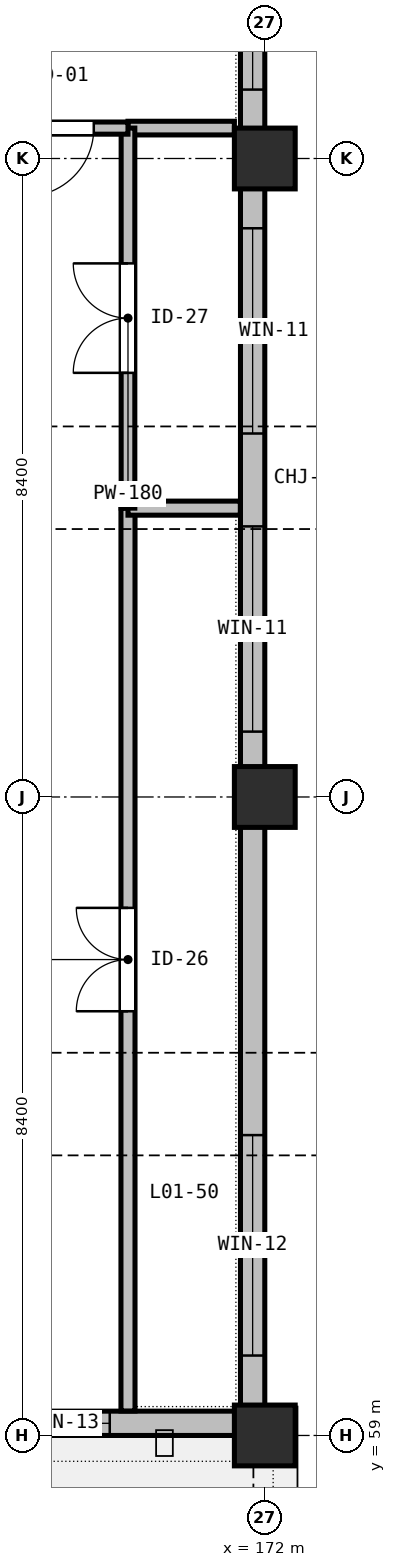
"""IFC4 building model, lengths in metres.
Left out: names, types, materials, properties, quantities, classifications, styles, units other than length and angle.
Written with IfcOpenShell. Run it as: python <this file> out.ifc"""

import sys

from ifc_helpers import new_model, si_unit, direction, frame, frame_2d, origin, origin_2d, place, context, subcontext, project, spatial, rectangle, extrude, element, fill, save


model = new_model("IFC4")
c1 = context("Model", 3, precision=1e-05, world=origin(), true_north=direction((0.0, 1.0)))
c2 = subcontext(c1, "Body", "Model", "MODEL_VIEW")
j1 = project(units=[si_unit("LENGTHUNIT", "METRE"), si_unit("PLANEANGLEUNIT", "RADIAN")], contexts=[c1])
p1 = place(None, origin())
s1 = spatial("IfcSite", under=j1, at=p1, CompositionType="ELEMENT")
p2 = place(p1, origin())
s2 = spatial("IfcBuilding", under=s1, at=p2, CompositionType="ELEMENT")
p3 = place(p2, frame((0.0, 0.0, 5.4)))
s3 = spatial("IfcBuildingStorey", under=s2, at=p3, CompositionType="ELEMENT", Elevation=5.4)
for number, where, z_axis, x_axis in (
    (1, (172.0, 59.0, 0.0), (0.0, 0.0, 1.0), (1.0, 0.0, 0.0)),
    (2, (172.0, 67.4, 0.0), (0.0, 0.0, 1.0), (1.0, 0.0, 0.0)),
    (3, (172.0, 75.8, 0.0), (0.0, 0.0, 1.0), (1.0, 0.0, 0.0)),
):
    element("IfcColumn", number, at=place(p3, frame(where, z_axis=z_axis, x_axis=x_axis)), inside=s3, PredefinedType="COLUMN", context=c2, shape_type="SweptSolid", body=[
        extrude(rectangle(XDim=0.8, YDim=0.8, at=origin_2d()), origin(), (0.0, 0.0, 1.0), 4.8),
    ])
p4 = place(p3, frame((171.84, 83.88, 0.0), z_axis=(0.0, 0.0, 1.0), x_axis=(0.0, -1.0, 0.0)))
e4 = element("IfcWall", 4, at=p4, inside=s3, PredefinedType="STANDARD", context=c2, shape_type="SweptSolid", body=[
    extrude(rectangle(XDim=8.08, YDim=0.32, at=frame_2d((4.04, 0.0))), origin(), (0.0, 0.0, 1.0), 4.085),
])
p5 = place(p4, frame((0.906, 0.0, 0.75)))
e5 = element("IfcOpeningElement", 5, at=p5, cuts=e4, PredefinedType="OPENING", context=c2, shape_type="SweptSolid", body=[
    extrude(rectangle(XDim=2.55, YDim=2.15, at=frame_2d((1.275, 1.075))), frame((0.0, 0.17, 0.0), z_axis=(0.0, -1.0, 0.0), x_axis=(1.0, 0.0, 0.0)), (0.0, 0.0, 1.0), 0.34),
])
p6 = place(p4, frame((4.623, 0.0, 0.75)))
e6 = element("IfcOpeningElement", 6, at=p6, cuts=e4, PredefinedType="OPENING", context=c2, shape_type="SweptSolid", body=[
    extrude(rectangle(XDim=2.55, YDim=2.15, at=frame_2d((1.275, 1.075))), frame((0.0, 0.17, 0.0), z_axis=(0.0, -1.0, 0.0), x_axis=(1.0, 0.0, 0.0)), (0.0, 0.0, 1.0), 0.34),
])
p7 = place(p3, frame((171.84, 75.8, 0.0), z_axis=(0.0, 0.0, 1.0), x_axis=(0.0, -1.0, 0.0)))
e7 = element("IfcWall", 7, at=p7, inside=s3, PredefinedType="STANDARD", context=c2, shape_type="SweptSolid", body=[
    extrude(rectangle(XDim=8.4, YDim=0.32, at=frame_2d((4.2, 0.0))), origin(), (0.0, 0.0, 1.0), 4.085),
])
p8 = place(p7, frame((0.918, 0.0, 0.75)))
e8 = element("IfcOpeningElement", 8, at=p8, cuts=e7, PredefinedType="OPENING", context=c2, shape_type="SweptSolid", body=[
    extrude(rectangle(XDim=2.7, YDim=2.2, at=frame_2d((1.35, 1.1))), frame((0.0, 0.17, 0.0), z_axis=(0.0, -1.0, 0.0), x_axis=(1.0, 0.0, 0.0)), (0.0, 0.0, 1.0), 0.34),
])
p9 = place(p7, frame((4.84, 0.0, 0.75)))
e9 = element("IfcOpeningElement", 9, at=p9, cuts=e7, PredefinedType="OPENING", context=c2, shape_type="SweptSolid", body=[
    extrude(rectangle(XDim=2.7, YDim=2.2, at=frame_2d((1.35, 1.1))), frame((0.0, 0.17, 0.0), z_axis=(0.0, -1.0, 0.0), x_axis=(1.0, 0.0, 0.0)), (0.0, 0.0, 1.0), 0.34),
])
p10 = place(p3, frame((171.84, 67.4, 0.0), z_axis=(0.0, 0.0, 1.0), x_axis=(0.0, -1.0, 0.0)))
e10 = element("IfcWall", 10, at=p10, inside=s3, PredefinedType="STANDARD", context=c2, shape_type="SweptSolid", body=[
    extrude(rectangle(XDim=8.08, YDim=0.32, at=frame_2d((4.04, 0.0))), origin(), (0.0, 0.0, 1.0), 4.085),
])
p11 = place(p10, frame((4.448, 0.0, 0.75)))
e11 = element("IfcOpeningElement", 11, at=p11, cuts=e10, PredefinedType="OPENING", context=c2, shape_type="SweptSolid", body=[
    extrude(rectangle(XDim=2.9, YDim=2.2, at=frame_2d((1.45, 1.1))), frame((0.0, 0.17, 0.0), z_axis=(0.0, -1.0, 0.0), x_axis=(1.0, 0.0, 0.0)), (0.0, 0.0, 1.0), 0.34),
])
p12 = place(p3, frame((172.0, 59.16, 0.0), z_axis=(0.0, 0.0, 1.0), x_axis=(-1.0, 0.0, 0.0)))
e12 = element("IfcWall", 12, at=p12, inside=s3, PredefinedType="STANDARD", context=c2, shape_type="SweptSolid", body=[
    extrude(rectangle(XDim=6.8, YDim=0.32, at=frame_2d((3.4, 0.0))), origin(), (0.0, 0.0, 1.0), 3.935),
])
p13 = place(p12, frame((2.04, 0.0, 0.9)))
e13 = element("IfcOpeningElement", 13, at=p13, cuts=e12, PredefinedType="OPENING", context=c2, shape_type="SweptSolid", body=[
    extrude(rectangle(XDim=1.2, YDim=1.5, at=frame_2d((0.6, 0.75))), frame((0.0, 0.17, 0.0), z_axis=(0.0, -1.0, 0.0), x_axis=(1.0, 0.0, 0.0)), (0.0, 0.0, 1.0), 0.34),
])
p14 = place(p12, frame((4.364, 0.0, 0.9)))
e14 = element("IfcOpeningElement", 14, at=p14, cuts=e12, PredefinedType="OPENING", context=c2, shape_type="SweptSolid", body=[
    extrude(rectangle(XDim=1.2, YDim=1.5, at=frame_2d((0.6, 0.75))), frame((0.0, 0.17, 0.0), z_axis=(0.0, -1.0, 0.0), x_axis=(1.0, 0.0, 0.0)), (0.0, 0.0, 1.0), 0.34),
])
p15 = place(p3, frame((172.28, 59.23, 0.0), z_axis=(0.0, 0.0, 1.0), x_axis=(0.0, -1.0, 0.0)))
e15 = element("IfcWall", 15, at=p15, inside=s3, PredefinedType="PARAPET", context=c2, shape_type="SweptSolid", body=[
    extrude(rectangle(XDim=25.71, YDim=0.22, at=frame_2d((12.855, 0.0))), origin(), (0.0, 0.0, 1.0), 0.68),
])
p16 = place(p3, frame((170.2, 59.322, 0.0), z_axis=(0.0, 0.0, 1.0), x_axis=(0.0, 1.0, 0.0)))
e16 = element("IfcWall", 16, at=p16, inside=s3, PredefinedType="PARTITIONING", context=c2, shape_type="SweptSolid", body=[
    extrude(rectangle(XDim=11.878, YDim=0.185, at=frame_2d((5.939, 0.0))), origin(), (0.0, 0.0, 1.0), 4.085),
])
p17 = place(p16, frame((5.259, 0.0, 0.0)))
e17 = element("IfcOpeningElement", 17, at=p17, cuts=e16, PredefinedType="OPENING", context=c2, shape_type="SweptSolid", body=[
    extrude(rectangle(XDim=1.36, YDim=2.14, at=frame_2d((0.68, 1.07))), frame((0.0, 0.103, 0.0), z_axis=(0.0, -1.0, 0.0), x_axis=(1.0, 0.0, 0.0)), (0.0, 0.0, 1.0), 0.205),
])
p18 = place(p3, frame((170.2, 71.2, 0.0), z_axis=(0.0, 0.0, 1.0), x_axis=(1.0, 0.0, 0.0)))
e18 = element("IfcWall", 18, at=p18, inside=s3, PredefinedType="PARTITIONING", context=c2, shape_type="SweptSolid", body=[
    extrude(rectangle(XDim=1.478, YDim=0.185, at=frame_2d((0.739, 0.0))), origin(), (0.0, 0.0, 1.0), 4.085),
])
p19 = place(p3, frame((170.2, 76.2, 0.0), z_axis=(0.0, 0.0, 1.0), x_axis=(1.0, 0.0, 0.0)))
e19 = element("IfcWall", 19, at=p19, inside=s3, PredefinedType="PARTITIONING", context=c2, shape_type="SweptSolid", body=[
    extrude(rectangle(XDim=1.4, YDim=0.18, at=frame_2d((0.7, 0.0))), origin(), (0.0, 0.0, 1.0), 4.445),
])
p20 = place(p3, frame((170.2, 71.2, 0.0), z_axis=(0.0, 0.0, 1.0), x_axis=(0.0, 1.0, 0.0)))
e20 = element("IfcWall", 20, at=p20, inside=s3, PredefinedType="PARTITIONING", context=c2, shape_type="SweptSolid", body=[
    extrude(rectangle(XDim=5.0, YDim=0.18, at=frame_2d((2.5, 0.0))), origin(), (0.0, 0.0, 1.0), 4.135),
])
p21 = place(p20, frame((1.78, 0.0, 0.0)))
e21 = element("IfcOpeningElement", 21, at=p21, cuts=e20, PredefinedType="OPENING", context=c2, shape_type="SweptSolid", body=[
    extrude(rectangle(XDim=1.44, YDim=2.14, at=frame_2d((0.72, 1.07))), frame((0.0, 0.1, 0.0), z_axis=(0.0, -1.0, 0.0), x_axis=(1.0, 0.0, 0.0)), (0.0, 0.0, 1.0), 0.2),
])
p22 = place(p3, frame((170.2, 76.2, 0.0), z_axis=(0.0, 0.0, 1.0), x_axis=(-1.0, 0.0, 0.0)))
e22 = element("IfcWall", 22, at=p22, inside=s3, PredefinedType="PARTITIONING", context=c2, shape_type="SweptSolid", body=[
    extrude(rectangle(XDim=1.8, YDim=0.16, at=frame_2d((0.9, 0.0))), origin(), (0.0, 0.0, 1.0), 4.285),
])
p23 = place(p22, frame((0.45, 0.0, 0.0)))
e23 = element("IfcOpeningElement", 23, at=p23, cuts=e22, PredefinedType="OPENING", context=c2, shape_type="SweptSolid", body=[
    extrude(rectangle(XDim=0.9, YDim=2.02, at=frame_2d((0.45, 1.01))), frame((0.0, 0.09, 0.0), z_axis=(0.0, -1.0, 0.0), x_axis=(1.0, 0.0, 0.0)), (0.0, 0.0, 1.0), 0.18),
])
p24 = place(p6, origin())
e24 = element("IfcWindow", 24, at=p24, inside=s3, PartitioningType="SINGLE_PANEL", PredefinedType="WINDOW", context=c2, shape_type="SweptSolid", body=[
    extrude(rectangle(XDim=2.55, YDim=2.15, at=frame_2d((1.275, 1.075))), frame((0.0, 0.03, 0.0), z_axis=(0.0, -1.0, 0.0), x_axis=(1.0, 0.0, 0.0)), (0.0, 0.0, 1.0), 0.06),
])
fill(e6, e24)
p25 = place(p8, origin())
e25 = element("IfcWindow", 25, at=p25, inside=s3, PartitioningType="SINGLE_PANEL", PredefinedType="WINDOW", context=c2, shape_type="SweptSolid", body=[
    extrude(rectangle(XDim=2.7, YDim=2.2, at=frame_2d((1.35, 1.1))), frame((0.0, 0.03, 0.0), z_axis=(0.0, -1.0, 0.0), x_axis=(1.0, 0.0, 0.0)), (0.0, 0.0, 1.0), 0.06),
])
fill(e8, e25)
p26 = place(p9, origin())
e26 = element("IfcWindow", 26, at=p26, inside=s3, PartitioningType="SINGLE_PANEL", PredefinedType="WINDOW", context=c2, shape_type="SweptSolid", body=[
    extrude(rectangle(XDim=2.7, YDim=2.2, at=frame_2d((1.35, 1.1))), frame((0.0, 0.03, 0.0), z_axis=(0.0, -1.0, 0.0), x_axis=(1.0, 0.0, 0.0)), (0.0, 0.0, 1.0), 0.06),
])
fill(e9, e26)
p27 = place(p11, origin())
e27 = element("IfcWindow", 27, at=p27, inside=s3, PartitioningType="SINGLE_PANEL", PredefinedType="WINDOW", context=c2, shape_type="SweptSolid", body=[
    extrude(rectangle(XDim=2.9, YDim=2.2, at=frame_2d((1.45, 1.1))), frame((0.0, 0.03, 0.0), z_axis=(0.0, -1.0, 0.0), x_axis=(1.0, 0.0, 0.0)), (0.0, 0.0, 1.0), 0.06),
])
fill(e11, e27)
p28 = place(p13, origin())
e28 = element("IfcWindow", 28, at=p28, inside=s3, PartitioningType="SINGLE_PANEL", PredefinedType="WINDOW", context=c2, shape_type="SweptSolid", body=[
    extrude(rectangle(XDim=1.2, YDim=1.5, at=frame_2d((0.6, 0.75))), frame((0.0, 0.03, 0.0), z_axis=(0.0, -1.0, 0.0), x_axis=(1.0, 0.0, 0.0)), (0.0, 0.0, 1.0), 0.06),
])
fill(e13, e28)
p29 = place(p17, origin())
e29 = element("IfcDoor", 29, at=p29, inside=s3, OperationType="DOUBLE_DOOR_SINGLE_SWING", PredefinedType="DOOR", context=c2, shape_type="SweptSolid", body=[
    extrude(rectangle(XDim=1.36, YDim=2.14, at=frame_2d((0.68, 1.07))), frame((0.0, 0.025, 0.0), z_axis=(0.0, -1.0, 0.0), x_axis=(1.0, 0.0, 0.0)), (0.0, 0.0, 1.0), 0.05),
])
fill(e17, e29)
p30 = place(p21, origin())
e30 = element("IfcDoor", 30, at=p30, inside=s3, OperationType="DOUBLE_DOOR_SINGLE_SWING", PredefinedType="DOOR", context=c2, shape_type="SweptSolid", body=[
    extrude(rectangle(XDim=1.44, YDim=2.14, at=frame_2d((0.72, 1.07))), frame((0.0, 0.025, 0.0), z_axis=(0.0, -1.0, 0.0), x_axis=(1.0, 0.0, 0.0)), (0.0, 0.0, 1.0), 0.05),
])
fill(e21, e30)
p31 = place(p23, origin())
e31 = element("IfcDoor", 31, at=p31, inside=s3, OperationType="SINGLE_SWING_RIGHT", PredefinedType="DOOR", context=c2, shape_type="SweptSolid", body=[
    extrude(rectangle(XDim=0.9, YDim=2.02, at=frame_2d((0.45, 1.01))), frame((0.0, 0.025, 0.0), z_axis=(0.0, -1.0, 0.0), x_axis=(1.0, 0.0, 0.0)), (0.0, 0.0, 1.0), 0.05),
])
fill(e23, e31)
save(model, sys.argv[1])
